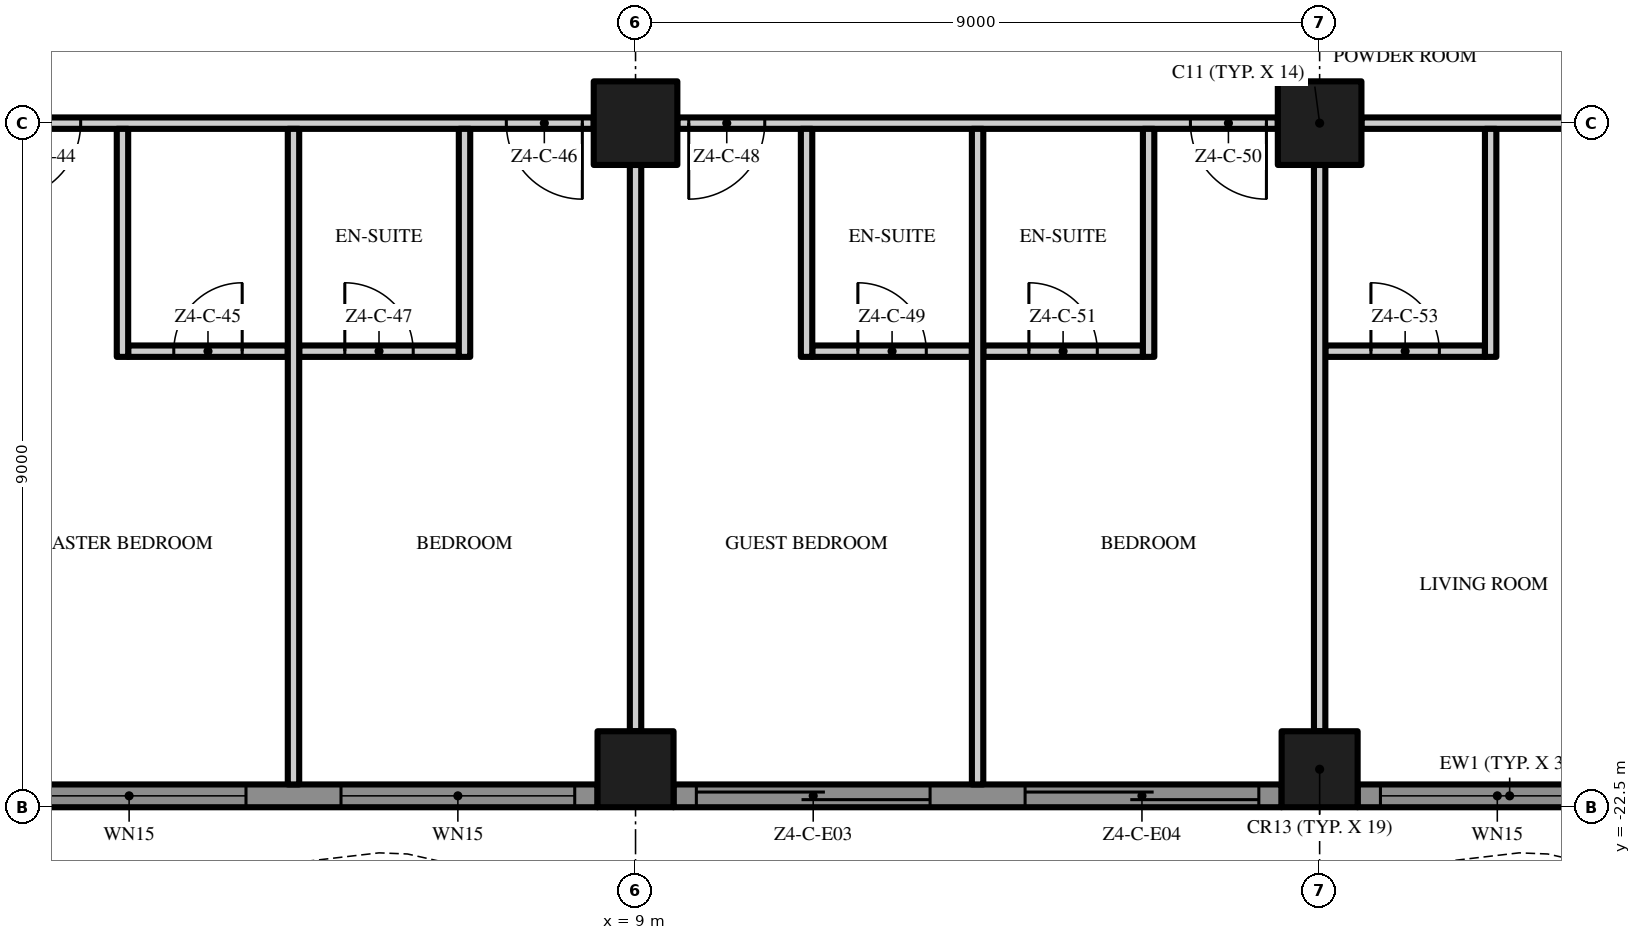
"""IFC4 building model, lengths in metres.
Left out: names, types, materials, properties, quantities, classifications, styles, units other than length and angle.
Written with IfcOpenShell. Run it as: python <this file> out.ifc"""

import sys

from ifc_helpers import new_model, si_unit, direction, frame, frame_2d, origin, origin_2d, place, context, subcontext, project, spatial, polyline, rectangle, outline, extrude, element, fill, save


model = new_model("IFC4")
c1 = context("Model", 3, precision=1e-05, world=origin(), true_north=direction((0.0, 1.0)))
c2 = subcontext(c1, "Body", "Model", "MODEL_VIEW")
j1 = project(units=[si_unit("LENGTHUNIT", "METRE"), si_unit("PLANEANGLEUNIT", "RADIAN")], contexts=[c1])
p1 = place(None, origin())
s1 = spatial("IfcSite", under=j1, at=p1, CompositionType="ELEMENT")
p2 = place(p1, origin())
s2 = spatial("IfcBuilding", under=s1, at=p2, CompositionType="ELEMENT")
p3 = place(p2, frame((0.0, 0.0, 207.2)))
s3 = spatial("IfcBuildingStorey", under=s2, at=p3, CompositionType="ELEMENT", Elevation=207.2)
p4 = place(p3, frame((18.0, -13.5, 0.0), z_axis=(0.0, 0.0, 1.0), x_axis=(1.0, 0.0, 0.0)))
e1 = element("IfcColumn", 1, at=p4, inside=s3, PredefinedType="COLUMN", context=c2, shape_type="SweptSolid", body=[
    extrude(rectangle(XDim=1.1, YDim=1.1, at=origin_2d()), origin(), (0.0, 0.0, 1.0), 3.5),
])
p5 = place(p3, frame((18.0, -22.0, 0.0), z_axis=(0.0, 0.0, 1.0), x_axis=(1.0, 0.0, 0.0)))
e2 = element("IfcColumn", 2, at=p5, inside=s3, PredefinedType="COLUMN", context=c2, shape_type="SweptSolid", body=[
    extrude(rectangle(XDim=1.0, YDim=1.0, at=origin_2d()), origin(), (0.0, 0.0, 1.0), 3.5),
])
p6 = place(p3, frame((9.0, -13.5, 0.0), z_axis=(0.0, 0.0, 1.0), x_axis=(1.0, 0.0, 0.0)))
e3 = element("IfcColumn", 3, at=p6, inside=s3, PredefinedType="COLUMN", context=c2, shape_type="SweptSolid", body=[
    extrude(rectangle(XDim=1.1, YDim=1.1, at=origin_2d()), origin(), (0.0, 0.0, 1.0), 3.5),
])
p7 = place(p3, frame((9.0, -22.0, 0.0), z_axis=(0.0, 0.0, 1.0), x_axis=(1.0, 0.0, 0.0)))
e4 = element("IfcColumn", 4, at=p7, inside=s3, PredefinedType="COLUMN", context=c2, shape_type="SweptSolid", body=[
    extrude(rectangle(XDim=1.0, YDim=1.0, at=origin_2d()), origin(), (0.0, 0.0, 1.0), 3.5),
])
p8 = place(p3, frame((8.5, -22.35, 0.0), z_axis=(0.0, 0.0, 1.0), x_axis=(-1.0, 0.0, 0.0)))
e5 = element("IfcWall", 5, at=p8, inside=s3, PredefinedType="SOLIDWALL", context=c2, shape_type="SweptSolid", body=[
    extrude(rectangle(XDim=8.0, YDim=0.3, at=frame_2d((4.0, 0.0))), origin(), (0.0, 0.0, 1.0), 3.5),
])
p9 = place(p8, frame((4.625, 0.0, 0.45)))
e6 = element("IfcOpeningElement", 6, at=p9, cuts=e5, PredefinedType="OPENING", context=c2, shape_type="SweptSolid", body=[
    extrude(rectangle(XDim=3.075, YDim=2.65, at=frame_2d((1.538, 1.325))), frame((0.0, 0.16, 0.0), z_axis=(0.0, -1.0, 0.0), x_axis=(1.0, 0.0, 0.0)), (0.0, 0.0, 1.0), 0.32),
])
p10 = place(p8, frame((0.3, 0.0, 0.45)))
e7 = element("IfcOpeningElement", 7, at=p10, cuts=e5, PredefinedType="OPENING", context=c2, shape_type="SweptSolid", body=[
    extrude(rectangle(XDim=3.075, YDim=2.65, at=frame_2d((1.538, 1.325))), frame((0.0, 0.16, 0.0), z_axis=(0.0, -1.0, 0.0), x_axis=(1.0, 0.0, 0.0)), (0.0, 0.0, 1.0), 0.32),
])
p11 = place(p3, frame((17.5, -22.35, 0.0), z_axis=(0.0, 0.0, 1.0), x_axis=(-1.0, 0.0, 0.0)))
e8 = element("IfcWall", 8, at=p11, inside=s3, PredefinedType="SOLIDWALL", context=c2, shape_type="SweptSolid", body=[
    extrude(rectangle(XDim=8.0, YDim=0.3, at=frame_2d((4.0, 0.0))), origin(), (0.0, 0.0, 1.0), 3.5),
])
p12 = place(p11, frame((4.625, 0.0, 0.0)))
e9 = element("IfcOpeningElement", 9, at=p12, cuts=e8, PredefinedType="OPENING", context=c2, shape_type="SweptSolid", body=[
    extrude(rectangle(XDim=3.075, YDim=2.4, at=frame_2d((1.538, 1.2))), frame((0.0, 0.16, 0.0), z_axis=(0.0, -1.0, 0.0), x_axis=(1.0, 0.0, 0.0)), (0.0, 0.0, 1.0), 0.32),
])
p13 = place(p11, frame((0.3, 0.0, 0.0)))
e10 = element("IfcOpeningElement", 10, at=p13, cuts=e8, PredefinedType="OPENING", context=c2, shape_type="SweptSolid", body=[
    extrude(rectangle(XDim=3.075, YDim=2.4, at=frame_2d((1.538, 1.2))), frame((0.0, 0.16, 0.0), z_axis=(0.0, -1.0, 0.0), x_axis=(1.0, 0.0, 0.0)), (0.0, 0.0, 1.0), 0.32),
])
p14 = place(p3, frame((22.5, -22.35, 0.0), z_axis=(0.0, 0.0, 1.0), x_axis=(-1.0, 0.0, 0.0)))
e11 = element("IfcWall", 11, at=p14, inside=s3, PredefinedType="SOLIDWALL", context=c2, shape_type="SweptSolid", body=[
    extrude(rectangle(XDim=4.0, YDim=0.3, at=frame_2d((2.0, 0.0))), origin(), (0.0, 0.0, 1.0), 3.5),
])
p15 = place(p14, frame((0.625, 0.0, 0.45)))
e12 = element("IfcOpeningElement", 12, at=p15, cuts=e11, PredefinedType="OPENING", context=c2, shape_type="SweptSolid", body=[
    extrude(rectangle(XDim=3.075, YDim=2.65, at=frame_2d((1.538, 1.325))), frame((0.0, 0.16, 0.0), z_axis=(0.0, -1.0, 0.0), x_axis=(1.0, 0.0, 0.0)), (0.0, 0.0, 1.0), 0.32),
])
p16 = place(p3, origin())
e13 = element("IfcWall", 13, at=p16, inside=s3, PredefinedType="USERDEFINED", context=c2, shape_type="SweptSolid", body=[
    extrude(outline(polyline([(-22.5, -23.451), (-21.0, -24.112), (-19.5, -24.845), (-18.0, -25.369), (-16.875, -25.5), (-16.5, -25.485), (-15.0, -25.149), (-13.5, -24.488), (-12.0, -23.755), (-10.5, -23.231), (-9.375, -23.1), (-9.0, -23.115), (-7.5, -23.451), (-6.0, -24.112), (-4.5, -24.845), (-3.0, -25.369), (-1.875, -25.5), (-1.5, -25.485), (0.0, -25.149), (1.5, -24.488), (3.0, -23.755), (4.5, -23.231), (5.625, -23.1), (6.0, -23.115), (7.5, -23.451), (9.0, -24.112), (10.5, -24.845), (12.0, -25.369), (13.125, -25.5), (13.5, -25.485), (15.0, -25.149), (16.5, -24.488), (18.0, -23.755), (19.5, -23.231), (20.625, -23.1), (21.0, -23.115), (22.5, -23.451), (22.555, -23.208), (21.033, -22.866), (20.615, -22.849), (19.444, -22.986), (17.904, -23.524), (16.395, -24.261), (14.921, -24.91), (13.467, -25.236), (13.135, -25.249), (12.056, -25.124), (10.596, -24.614), (9.105, -23.885), (7.579, -23.213), (6.033, -22.866), (5.615, -22.849), (4.444, -22.986), (2.904, -23.524), (1.395, -24.261), (-0.079, -24.91), (-1.533, -25.236), (-1.865, -25.249), (-2.944, -25.124), (-4.404, -24.614), (-5.895, -23.885), (-7.421, -23.213), (-8.967, -22.866), (-9.385, -22.849), (-10.556, -22.986), (-12.096, -23.524), (-13.605, -24.261), (-15.079, -24.91), (-16.533, -25.236), (-16.865, -25.249), (-17.944, -25.124), (-19.404, -24.614), (-20.895, -23.885), (-22.399, -23.223), (-22.5, -23.451)])), origin(), (0.0, 0.0, 1.0), 0.9),
])
p17 = place(p3, frame((2.325, -16.5, 0.0), z_axis=(0.0, 0.0, 1.0), x_axis=(1.0, 0.0, 0.0)))
e14 = element("IfcWall", 14, at=p17, inside=s3, PredefinedType="PARTITIONING", context=c2, shape_type="SweptSolid", body=[
    extrude(rectangle(XDim=2.1, YDim=0.15, at=frame_2d((1.05, 0.0))), origin(), (0.0, 0.0, 1.0), 3.5),
])
p18 = place(p17, frame((0.6, 0.0, 0.0)))
e15 = element("IfcOpeningElement", 15, at=p18, cuts=e14, PredefinedType="OPENING", context=c2, shape_type="SweptSolid", body=[
    extrude(rectangle(XDim=0.9, YDim=2.1, at=frame_2d((0.45, 1.05))), frame((0.0, 0.085, 0.0), z_axis=(0.0, -1.0, 0.0), x_axis=(1.0, 0.0, 0.0)), (0.0, 0.0, 1.0), 0.17),
])
p19 = place(p3, frame((4.575, -16.5, 0.0), z_axis=(0.0, 0.0, 1.0), x_axis=(1.0, 0.0, 0.0)))
e16 = element("IfcWall", 16, at=p19, inside=s3, PredefinedType="PARTITIONING", context=c2, shape_type="SweptSolid", body=[
    extrude(rectangle(XDim=2.1, YDim=0.15, at=frame_2d((1.05, 0.0))), origin(), (0.0, 0.0, 1.0), 3.5),
])
p20 = place(p19, frame((0.6, 0.0, 0.0)))
e17 = element("IfcOpeningElement", 17, at=p20, cuts=e16, PredefinedType="OPENING", context=c2, shape_type="SweptSolid", body=[
    extrude(rectangle(XDim=0.9, YDim=2.1, at=frame_2d((0.45, 1.05))), frame((0.0, 0.085, 0.0), z_axis=(0.0, -1.0, 0.0), x_axis=(1.0, 0.0, 0.0)), (0.0, 0.0, 1.0), 0.17),
])
p21 = place(p3, frame((11.325, -16.5, 0.0), z_axis=(0.0, 0.0, 1.0), x_axis=(1.0, 0.0, 0.0)))
e18 = element("IfcWall", 18, at=p21, inside=s3, PredefinedType="PARTITIONING", context=c2, shape_type="SweptSolid", body=[
    extrude(rectangle(XDim=2.1, YDim=0.15, at=frame_2d((1.05, 0.0))), origin(), (0.0, 0.0, 1.0), 3.5),
])
p22 = place(p21, frame((0.6, 0.0, 0.0)))
e19 = element("IfcOpeningElement", 19, at=p22, cuts=e18, PredefinedType="OPENING", context=c2, shape_type="SweptSolid", body=[
    extrude(rectangle(XDim=0.9, YDim=2.1, at=frame_2d((0.45, 1.05))), frame((0.0, 0.085, 0.0), z_axis=(0.0, -1.0, 0.0), x_axis=(1.0, 0.0, 0.0)), (0.0, 0.0, 1.0), 0.17),
])
p23 = place(p3, frame((13.575, -16.5, 0.0), z_axis=(0.0, 0.0, 1.0), x_axis=(1.0, 0.0, 0.0)))
e20 = element("IfcWall", 20, at=p23, inside=s3, PredefinedType="PARTITIONING", context=c2, shape_type="SweptSolid", body=[
    extrude(rectangle(XDim=2.1, YDim=0.15, at=frame_2d((1.05, 0.0))), origin(), (0.0, 0.0, 1.0), 3.5),
])
p24 = place(p23, frame((0.6, 0.0, 0.0)))
e21 = element("IfcOpeningElement", 21, at=p24, cuts=e20, PredefinedType="OPENING", context=c2, shape_type="SweptSolid", body=[
    extrude(rectangle(XDim=0.9, YDim=2.1, at=frame_2d((0.45, 1.05))), frame((0.0, 0.085, 0.0), z_axis=(0.0, -1.0, 0.0), x_axis=(1.0, 0.0, 0.0)), (0.0, 0.0, 1.0), 0.17),
])
p25 = place(p3, frame((18.075, -16.5, 0.0), z_axis=(0.0, 0.0, 1.0), x_axis=(1.0, 0.0, 0.0)))
e22 = element("IfcWall", 22, at=p25, inside=s3, PredefinedType="PARTITIONING", context=c2, shape_type="SweptSolid", body=[
    extrude(rectangle(XDim=2.1, YDim=0.15, at=frame_2d((1.05, 0.0))), origin(), (0.0, 0.0, 1.0), 3.5),
])
p26 = place(p25, frame((0.6, 0.0, 0.0)))
e23 = element("IfcOpeningElement", 23, at=p26, cuts=e22, PredefinedType="OPENING", context=c2, shape_type="SweptSolid", body=[
    extrude(rectangle(XDim=0.9, YDim=2.1, at=frame_2d((0.45, 1.05))), frame((0.0, 0.085, 0.0), z_axis=(0.0, -1.0, 0.0), x_axis=(1.0, 0.0, 0.0)), (0.0, 0.0, 1.0), 0.17),
])
p27 = place(p3, frame((8.45, -13.5, 0.0), z_axis=(0.0, 0.0, 1.0), x_axis=(-1.0, 0.0, 0.0)))
e24 = element("IfcWall", 24, at=p27, inside=s3, PredefinedType="PARTITIONING", context=c2, shape_type="SweptSolid", body=[
    extrude(rectangle(XDim=7.9, YDim=0.15, at=frame_2d((3.95, 0.0))), origin(), (0.0, 0.0, 1.0), 3.5),
])
p28 = place(p27, frame((6.75, 0.0, 0.0)))
e25 = element("IfcOpeningElement", 25, at=p28, cuts=e24, PredefinedType="OPENING", context=c2, shape_type="SweptSolid", body=[
    extrude(rectangle(XDim=1.0, YDim=2.4, at=frame_2d((0.5, 1.2))), frame((0.0, 0.085, 0.0), z_axis=(0.0, -1.0, 0.0), x_axis=(1.0, 0.0, 0.0)), (0.0, 0.0, 1.0), 0.17),
])
p29 = place(p27, frame((0.15, 0.0, 0.0)))
e26 = element("IfcOpeningElement", 26, at=p29, cuts=e24, PredefinedType="OPENING", context=c2, shape_type="SweptSolid", body=[
    extrude(rectangle(XDim=1.0, YDim=2.4, at=frame_2d((0.5, 1.2))), frame((0.0, 0.085, 0.0), z_axis=(0.0, -1.0, 0.0), x_axis=(1.0, 0.0, 0.0)), (0.0, 0.0, 1.0), 0.17),
])
p30 = place(p3, frame((17.45, -13.5, 0.0), z_axis=(0.0, 0.0, 1.0), x_axis=(-1.0, 0.0, 0.0)))
e27 = element("IfcWall", 27, at=p30, inside=s3, PredefinedType="PARTITIONING", context=c2, shape_type="SweptSolid", body=[
    extrude(rectangle(XDim=7.9, YDim=0.15, at=frame_2d((3.95, 0.0))), origin(), (0.0, 0.0, 1.0), 3.5),
])
p31 = place(p30, frame((6.75, 0.0, 0.0)))
e28 = element("IfcOpeningElement", 28, at=p31, cuts=e27, PredefinedType="OPENING", context=c2, shape_type="SweptSolid", body=[
    extrude(rectangle(XDim=1.0, YDim=2.4, at=frame_2d((0.5, 1.2))), frame((0.0, 0.085, 0.0), z_axis=(0.0, -1.0, 0.0), x_axis=(1.0, 0.0, 0.0)), (0.0, 0.0, 1.0), 0.17),
])
p32 = place(p30, frame((0.15, 0.0, 0.0)))
e29 = element("IfcOpeningElement", 29, at=p32, cuts=e27, PredefinedType="OPENING", context=c2, shape_type="SweptSolid", body=[
    extrude(rectangle(XDim=1.0, YDim=2.4, at=frame_2d((0.5, 1.2))), frame((0.0, 0.085, 0.0), z_axis=(0.0, -1.0, 0.0), x_axis=(1.0, 0.0, 0.0)), (0.0, 0.0, 1.0), 0.17),
])
p33 = place(p3, frame((26.0, -13.5, 0.0), z_axis=(0.0, 0.0, 1.0), x_axis=(-1.0, 0.0, 0.0)))
e30 = element("IfcWall", 30, at=p33, inside=s3, PredefinedType="PARTITIONING", context=c2, shape_type="SweptSolid", body=[
    extrude(rectangle(XDim=7.45, YDim=0.15, at=frame_2d((3.725, 0.0))), origin(), (0.0, 0.0, 1.0), 3.5),
])
p34 = place(p33, frame((1.5, 0.0, 0.0)))
e31 = element("IfcOpeningElement", 31, at=p34, cuts=e30, PredefinedType="OPENING", context=c2, shape_type="SweptSolid", body=[
    extrude(rectangle(XDim=1.8, YDim=2.4, at=frame_2d((0.9, 1.2))), frame((0.0, 0.085, 0.0), z_axis=(0.0, -1.0, 0.0), x_axis=(1.0, 0.0, 0.0)), (0.0, 0.0, 1.0), 0.17),
])
p35 = place(p3, frame((2.25, -16.575, 0.0), z_axis=(0.0, 0.0, 1.0), x_axis=(0.0, 1.0, 0.0)))
e32 = element("IfcWall", 32, at=p35, inside=s3, PredefinedType="PARTITIONING", context=c2, shape_type="SweptSolid", body=[
    extrude(rectangle(XDim=3.0, YDim=0.15, at=frame_2d((1.5, 0.0))), origin(), (0.0, 0.0, 1.0), 3.5),
])
p36 = place(p3, frame((4.5, -22.2, 0.0), z_axis=(0.0, 0.0, 1.0), x_axis=(0.0, 1.0, 0.0)))
e33 = element("IfcWall", 33, at=p36, inside=s3, PredefinedType="PARTITIONING", context=c2, shape_type="SweptSolid", body=[
    extrude(rectangle(XDim=8.625, YDim=0.15, at=frame_2d((4.312, 0.0))), origin(), (0.0, 0.0, 1.0), 3.5),
])
p37 = place(p3, frame((6.75, -16.575, 0.0), z_axis=(0.0, 0.0, 1.0), x_axis=(0.0, 1.0, 0.0)))
e34 = element("IfcWall", 34, at=p37, inside=s3, PredefinedType="PARTITIONING", context=c2, shape_type="SweptSolid", body=[
    extrude(rectangle(XDim=3.0, YDim=0.15, at=frame_2d((1.5, 0.0))), origin(), (0.0, 0.0, 1.0), 3.5),
])
p38 = place(p3, frame((9.0, -21.5, 0.0), z_axis=(0.0, 0.0, 1.0), x_axis=(0.0, 1.0, 0.0)))
e35 = element("IfcWall", 35, at=p38, inside=s3, PredefinedType="PARTITIONING", context=c2, shape_type="SweptSolid", body=[
    extrude(rectangle(XDim=7.45, YDim=0.15, at=frame_2d((3.725, 0.0))), origin(), (0.0, 0.0, 1.0), 3.5),
])
p39 = place(p3, frame((11.25, -16.575, 0.0), z_axis=(0.0, 0.0, 1.0), x_axis=(0.0, 1.0, 0.0)))
e36 = element("IfcWall", 36, at=p39, inside=s3, PredefinedType="PARTITIONING", context=c2, shape_type="SweptSolid", body=[
    extrude(rectangle(XDim=3.0, YDim=0.15, at=frame_2d((1.5, 0.0))), origin(), (0.0, 0.0, 1.0), 3.5),
])
p40 = place(p3, frame((13.5, -22.2, 0.0), z_axis=(0.0, 0.0, 1.0), x_axis=(0.0, 1.0, 0.0)))
e37 = element("IfcWall", 37, at=p40, inside=s3, PredefinedType="PARTITIONING", context=c2, shape_type="SweptSolid", body=[
    extrude(rectangle(XDim=8.625, YDim=0.15, at=frame_2d((4.312, 0.0))), origin(), (0.0, 0.0, 1.0), 3.5),
])
p41 = place(p3, frame((15.75, -16.575, 0.0), z_axis=(0.0, 0.0, 1.0), x_axis=(0.0, 1.0, 0.0)))
e38 = element("IfcWall", 38, at=p41, inside=s3, PredefinedType="PARTITIONING", context=c2, shape_type="SweptSolid", body=[
    extrude(rectangle(XDim=3.0, YDim=0.15, at=frame_2d((1.5, 0.0))), origin(), (0.0, 0.0, 1.0), 3.5),
])
p42 = place(p3, frame((18.0, -21.5, 0.0), z_axis=(0.0, 0.0, 1.0), x_axis=(0.0, 1.0, 0.0)))
e39 = element("IfcWall", 39, at=p42, inside=s3, PredefinedType="PARTITIONING", context=c2, shape_type="SweptSolid", body=[
    extrude(rectangle(XDim=7.45, YDim=0.15, at=frame_2d((3.725, 0.0))), origin(), (0.0, 0.0, 1.0), 3.5),
])
p43 = place(p3, frame((20.25, -16.575, 0.0), z_axis=(0.0, 0.0, 1.0), x_axis=(0.0, 1.0, 0.0)))
e40 = element("IfcWall", 40, at=p43, inside=s3, PredefinedType="PARTITIONING", context=c2, shape_type="SweptSolid", body=[
    extrude(rectangle(XDim=3.0, YDim=0.15, at=frame_2d((1.5, 0.0))), origin(), (0.0, 0.0, 1.0), 3.5),
])
p44 = place(p9, origin())
e41 = element("IfcWindow", 41, at=p44, inside=s3, PartitioningType="SINGLE_PANEL", PredefinedType="WINDOW", context=c2, shape_type="SweptSolid", body=[
    extrude(rectangle(XDim=3.075, YDim=2.65, at=frame_2d((1.538, 1.325))), frame((0.0, 0.03, 0.0), z_axis=(0.0, -1.0, 0.0), x_axis=(1.0, 0.0, 0.0)), (0.0, 0.0, 1.0), 0.06),
])
fill(e6, e41)
p45 = place(p10, origin())
e42 = element("IfcWindow", 42, at=p45, inside=s3, PartitioningType="SINGLE_PANEL", PredefinedType="WINDOW", context=c2, shape_type="SweptSolid", body=[
    extrude(rectangle(XDim=3.075, YDim=2.65, at=frame_2d((1.538, 1.325))), frame((0.0, 0.03, 0.0), z_axis=(0.0, -1.0, 0.0), x_axis=(1.0, 0.0, 0.0)), (0.0, 0.0, 1.0), 0.06),
])
fill(e7, e42)
p46 = place(p12, origin())
e43 = element("IfcDoor", 43, at=p46, inside=s3, OperationType="SINGLE_SWING_LEFT", PredefinedType="DOOR", context=c2, shape_type="SweptSolid", body=[
    extrude(rectangle(XDim=3.075, YDim=2.4, at=frame_2d((1.538, 1.2))), frame((0.0, 0.025, 0.0), z_axis=(0.0, -1.0, 0.0), x_axis=(1.0, 0.0, 0.0)), (0.0, 0.0, 1.0), 0.05),
])
fill(e9, e43)
p47 = place(p13, origin())
e44 = element("IfcDoor", 44, at=p47, inside=s3, OperationType="SINGLE_SWING_LEFT", PredefinedType="DOOR", context=c2, shape_type="SweptSolid", body=[
    extrude(rectangle(XDim=3.075, YDim=2.4, at=frame_2d((1.538, 1.2))), frame((0.0, 0.025, 0.0), z_axis=(0.0, -1.0, 0.0), x_axis=(1.0, 0.0, 0.0)), (0.0, 0.0, 1.0), 0.05),
])
fill(e10, e44)
p48 = place(p15, origin())
e45 = element("IfcWindow", 45, at=p48, inside=s3, PartitioningType="SINGLE_PANEL", PredefinedType="WINDOW", context=c2, shape_type="SweptSolid", body=[
    extrude(rectangle(XDim=3.075, YDim=2.65, at=frame_2d((1.538, 1.325))), frame((0.0, 0.03, 0.0), z_axis=(0.0, -1.0, 0.0), x_axis=(1.0, 0.0, 0.0)), (0.0, 0.0, 1.0), 0.06),
])
fill(e12, e45)
p49 = place(p28, origin())
e46 = element("IfcDoor", 46, at=p49, inside=s3, OperationType="SINGLE_SWING_RIGHT", PredefinedType="DOOR", context=c2, shape_type="SweptSolid", body=[
    extrude(rectangle(XDim=1.0, YDim=2.4, at=frame_2d((0.5, 1.2))), frame((0.0, 0.025, 0.0), z_axis=(0.0, -1.0, 0.0), x_axis=(1.0, 0.0, 0.0)), (0.0, 0.0, 1.0), 0.05),
])
fill(e25, e46)
p50 = place(p18, origin())
e47 = element("IfcDoor", 47, at=p50, inside=s3, OperationType="SINGLE_SWING_RIGHT", PredefinedType="DOOR", context=c2, shape_type="SweptSolid", body=[
    extrude(rectangle(XDim=0.9, YDim=2.1, at=frame_2d((0.45, 1.05))), frame((0.0, 0.025, 0.0), z_axis=(0.0, -1.0, 0.0), x_axis=(1.0, 0.0, 0.0)), (0.0, 0.0, 1.0), 0.05),
])
fill(e15, e47)
p51 = place(p29, origin())
e48 = element("IfcDoor", 48, at=p51, inside=s3, OperationType="SINGLE_SWING_LEFT", PredefinedType="DOOR", context=c2, shape_type="SweptSolid", body=[
    extrude(rectangle(XDim=1.0, YDim=2.4, at=frame_2d((0.5, 1.2))), frame((0.0, 0.025, 0.0), z_axis=(0.0, -1.0, 0.0), x_axis=(1.0, 0.0, 0.0)), (0.0, 0.0, 1.0), 0.05),
])
fill(e26, e48)
p52 = place(p20, origin())
e49 = element("IfcDoor", 49, at=p52, inside=s3, OperationType="SINGLE_SWING_LEFT", PredefinedType="DOOR", context=c2, shape_type="SweptSolid", body=[
    extrude(rectangle(XDim=0.9, YDim=2.1, at=frame_2d((0.45, 1.05))), frame((0.0, 0.025, 0.0), z_axis=(0.0, -1.0, 0.0), x_axis=(1.0, 0.0, 0.0)), (0.0, 0.0, 1.0), 0.05),
])
fill(e17, e49)
p53 = place(p31, origin())
e50 = element("IfcDoor", 50, at=p53, inside=s3, OperationType="SINGLE_SWING_RIGHT", PredefinedType="DOOR", context=c2, shape_type="SweptSolid", body=[
    extrude(rectangle(XDim=1.0, YDim=2.4, at=frame_2d((0.5, 1.2))), frame((0.0, 0.025, 0.0), z_axis=(0.0, -1.0, 0.0), x_axis=(1.0, 0.0, 0.0)), (0.0, 0.0, 1.0), 0.05),
])
fill(e28, e50)
p54 = place(p22, origin())
e51 = element("IfcDoor", 51, at=p54, inside=s3, OperationType="SINGLE_SWING_LEFT", PredefinedType="DOOR", context=c2, shape_type="SweptSolid", body=[
    extrude(rectangle(XDim=0.9, YDim=2.1, at=frame_2d((0.45, 1.05))), frame((0.0, 0.025, 0.0), z_axis=(0.0, -1.0, 0.0), x_axis=(1.0, 0.0, 0.0)), (0.0, 0.0, 1.0), 0.05),
])
fill(e19, e51)
p55 = place(p32, origin())
e52 = element("IfcDoor", 52, at=p55, inside=s3, OperationType="SINGLE_SWING_LEFT", PredefinedType="DOOR", context=c2, shape_type="SweptSolid", body=[
    extrude(rectangle(XDim=1.0, YDim=2.4, at=frame_2d((0.5, 1.2))), frame((0.0, 0.025, 0.0), z_axis=(0.0, -1.0, 0.0), x_axis=(1.0, 0.0, 0.0)), (0.0, 0.0, 1.0), 0.05),
])
fill(e29, e52)
p56 = place(p24, origin())
e53 = element("IfcDoor", 53, at=p56, inside=s3, OperationType="SINGLE_SWING_LEFT", PredefinedType="DOOR", context=c2, shape_type="SweptSolid", body=[
    extrude(rectangle(XDim=0.9, YDim=2.1, at=frame_2d((0.45, 1.05))), frame((0.0, 0.025, 0.0), z_axis=(0.0, -1.0, 0.0), x_axis=(1.0, 0.0, 0.0)), (0.0, 0.0, 1.0), 0.05),
])
fill(e21, e53)
p57 = place(p26, origin())
e54 = element("IfcDoor", 54, at=p57, inside=s3, OperationType="SINGLE_SWING_LEFT", PredefinedType="DOOR", context=c2, shape_type="SweptSolid", body=[
    extrude(rectangle(XDim=0.9, YDim=2.1, at=frame_2d((0.45, 1.05))), frame((0.0, 0.025, 0.0), z_axis=(0.0, -1.0, 0.0), x_axis=(1.0, 0.0, 0.0)), (0.0, 0.0, 1.0), 0.05),
])
fill(e23, e54)
save(model, sys.argv[1])
